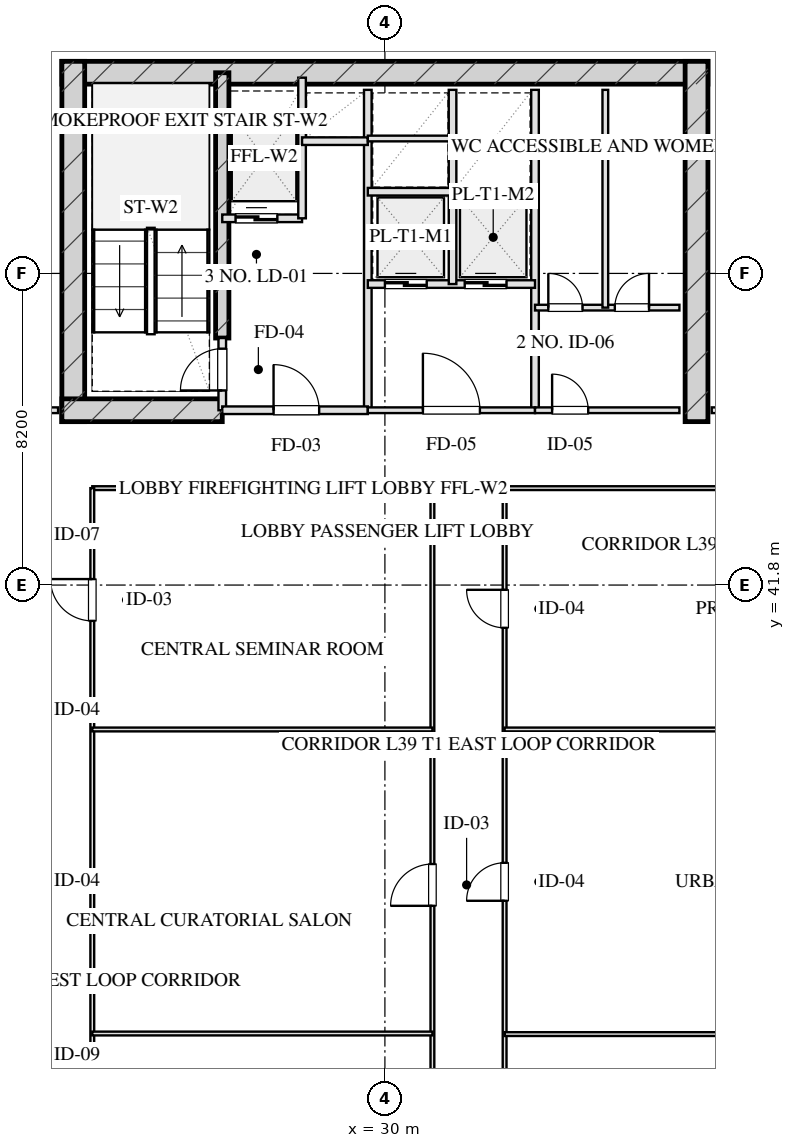
"""IFC4 building model, lengths in metres.
Left out: names, types, materials, properties, quantities, classifications, styles, units other than length and angle.
Written with IfcOpenShell. Run it as: python <this file> out.ifc"""

import sys

from ifc_helpers import new_model, si_unit, direction, frame, frame_2d, origin, place, context, subcontext, project, spatial, rectangle, extrude, element, fill, save


model = new_model("IFC4")
c1 = context("Model", 3, precision=1e-05, world=origin(), true_north=direction((0.0, 1.0)))
c2 = subcontext(c1, "Body", "Model", "MODEL_VIEW")
j1 = project(units=[si_unit("LENGTHUNIT", "METRE"), si_unit("PLANEANGLEUNIT", "RADIAN")], contexts=[c1])
p1 = place(None, origin())
s1 = spatial("IfcSite", under=j1, at=p1, CompositionType="ELEMENT")
p2 = place(p1, origin())
s2 = spatial("IfcBuilding", under=s1, at=p2, CompositionType="ELEMENT")
p3 = place(p2, frame((0.0, 0.0, 149.5)))
s3 = spatial("IfcBuildingStorey", under=s2, at=p3, CompositionType="ELEMENT", Elevation=149.5)
p4 = place(p3, frame((21.5, 55.28, 0.0), z_axis=(0.0, 0.0, 1.0), x_axis=(1.0, 0.0, 0.0)))
e1 = element("IfcWall", 1, at=p4, inside=s3, PredefinedType="SHEAR", context=c2, shape_type="SweptSolid", body=[
    extrude(rectangle(XDim=17.0, YDim=0.6, at=frame_2d((8.5, 0.0))), origin(), (0.0, 0.0, 1.0), 3.45),
])
for number, where, z_axis, x_axis in (
    (2, (21.8, 46.1, 0.0), (0.0, 0.0, 1.0), (0.0, 1.0, 0.0)),
    (3, (38.2, 46.1, 0.0), (0.0, 0.0, 1.0), (0.0, 1.0, 0.0)),
):
    element("IfcWall", number, at=place(p3, frame(where, z_axis=z_axis, x_axis=x_axis)), inside=s3, PredefinedType="SHEAR", context=c2, shape_type="SweptSolid", body=[
        extrude(rectangle(XDim=9.48, YDim=0.6, at=frame_2d((4.74, 0.0))), origin(), (0.0, 0.0, 1.0), 3.45),
    ])
p5 = place(p3, frame((25.72, 48.3, 0.0), z_axis=(0.0, 0.0, 1.0), x_axis=(0.0, 1.0, 0.0)))
e4 = element("IfcWall", 4, at=p5, inside=s3, PredefinedType="SHEAR", context=c2, shape_type="SweptSolid", body=[
    extrude(rectangle(XDim=6.98, YDim=0.35, at=frame_2d((3.49, 0.0))), origin(), (0.0, 0.0, 1.0), 3.45),
])
p6 = place(p3, frame((21.5, 46.4, 0.0), z_axis=(0.0, 0.0, 1.0), x_axis=(1.0, 0.0, 0.0)))
e5 = element("IfcWall", 5, at=p6, inside=s3, PredefinedType="SHEAR", context=c2, shape_type="SweptSolid", body=[
    extrude(rectangle(XDim=4.22, YDim=0.6, at=frame_2d((2.11, 0.0))), origin(), (0.0, 0.0, 1.0), 3.45),
])
p7 = place(p3, frame((25.72, 46.4, 0.0), z_axis=(0.0, 0.0, 1.0), x_axis=(0.0, 1.0, 0.0)))
e6 = element("IfcWall", 6, at=p7, inside=s3, PredefinedType="PARTITIONING", context=c2, shape_type="SweptSolid", body=[
    extrude(rectangle(XDim=1.9, YDim=0.2, at=frame_2d((0.95, 0.0))), origin(), (0.0, 0.0, 1.0), 3.175),
])
p8 = place(p7, frame((0.52, 0.0, 0.0)))
e7 = element("IfcOpeningElement", 7, at=p8, cuts=e6, PredefinedType="OPENING", context=c2, shape_type="SweptSolid", body=[
    extrude(rectangle(XDim=1.1, YDim=2.05, at=frame_2d((0.55, 1.025))), frame((0.0, 0.11, 0.0), z_axis=(0.0, -1.0, 0.0), x_axis=(1.0, 0.0, 0.0)), (0.0, 0.0, 1.0), 0.22),
])
p9 = place(p3, frame((29.55, 46.4, 0.0), z_axis=(0.0, 0.0, 1.0), x_axis=(0.0, 1.0, 0.0)))
e8 = element("IfcWall", 8, at=p9, inside=s3, PredefinedType="PARTITIONING", context=c2, shape_type="SweptSolid", body=[
    extrude(rectangle(XDim=8.43, YDim=0.2, at=frame_2d((4.215, 0.0))), origin(), (0.0, 0.0, 1.0), 3.175),
])
p10 = place(p3, frame((25.72, 46.4, 0.0), z_axis=(0.0, 0.0, 1.0), x_axis=(1.0, 0.0, 0.0)))
e9 = element("IfcWall", 9, at=p10, inside=s3, PredefinedType="PARTITIONING", context=c2, shape_type="SweptSolid", body=[
    extrude(rectangle(XDim=3.83, YDim=0.2, at=frame_2d((1.915, 0.0))), origin(), (0.0, 0.0, 1.0), 3.175),
])
p11 = place(p10, frame((1.35, 0.0, 0.0)))
e10 = element("IfcOpeningElement", 10, at=p11, cuts=e9, PredefinedType="OPENING", context=c2, shape_type="SweptSolid", body=[
    extrude(rectangle(XDim=1.2, YDim=2.05, at=frame_2d((0.6, 1.025))), frame((0.0, 0.11, 0.0), z_axis=(0.0, -1.0, 0.0), x_axis=(1.0, 0.0, 0.0)), (0.0, 0.0, 1.0), 0.22),
])
p12 = place(p3, frame((25.72, 51.45, 0.0), z_axis=(0.0, 0.0, 1.0), x_axis=(1.0, 0.0, 0.0)))
e11 = element("IfcWall", 11, at=p12, inside=s3, PredefinedType="PARTITIONING", context=c2, shape_type="SweptSolid", body=[
    extrude(rectangle(XDim=2.1, YDim=0.2, at=frame_2d((1.05, 0.0))), origin(), (0.0, 0.0, 1.0), 3.175),
])
p13 = place(p12, frame((0.35, 0.0, 0.0)))
e12 = element("IfcOpeningElement", 12, at=p13, cuts=e11, PredefinedType="OPENING", context=c2, shape_type="SweptSolid", body=[
    extrude(rectangle(XDim=1.1, YDim=2.05, at=frame_2d((0.55, 1.025))), frame((0.0, 0.11, 0.0), z_axis=(0.0, -1.0, 0.0), x_axis=(1.0, 0.0, 0.0)), (0.0, 0.0, 1.0), 0.22),
])
p14 = place(p3, frame((27.82, 51.45, 0.0), z_axis=(0.0, 0.0, 1.0), x_axis=(0.0, 1.0, 0.0)))
e13 = element("IfcWall", 13, at=p14, inside=s3, PredefinedType="PARTITIONING", context=c2, shape_type="SweptSolid", body=[
    extrude(rectangle(XDim=3.7, YDim=0.2, at=frame_2d((1.85, 0.0))), origin(), (0.0, 0.0, 1.0), 3.175),
])
p15 = place(p3, frame((27.82, 53.48, 0.0), z_axis=(0.0, 0.0, 1.0), x_axis=(1.0, 0.0, 0.0)))
e14 = element("IfcWall", 14, at=p15, inside=s3, PredefinedType="PARTITIONING", context=c2, shape_type="SweptSolid", body=[
    extrude(rectangle(XDim=1.73, YDim=0.2, at=frame_2d((0.865, 0.0))), origin(), (0.0, 0.0, 1.0), 3.175),
])
p16 = place(p3, frame((33.95, 46.4, 0.0), z_axis=(0.0, 0.0, 1.0), x_axis=(0.0, 1.0, 0.0)))
e15 = element("IfcWall", 15, at=p16, inside=s3, PredefinedType="PARTITIONING", context=c2, shape_type="SweptSolid", body=[
    extrude(rectangle(XDim=8.43, YDim=0.2, at=frame_2d((4.215, 0.0))), origin(), (0.0, 0.0, 1.0), 3.175),
])
p17 = place(p3, frame((29.55, 46.4, 0.0), z_axis=(0.0, 0.0, 1.0), x_axis=(1.0, 0.0, 0.0)))
e16 = element("IfcWall", 16, at=p17, inside=s3, PredefinedType="PARTITIONING", context=c2, shape_type="SweptSolid", body=[
    extrude(rectangle(XDim=4.4, YDim=0.15, at=frame_2d((2.2, 0.0))), origin(), (0.0, 0.0, 1.0), 3.175),
])
p18 = place(p17, frame((1.45, 0.0, 0.0)))
e17 = element("IfcOpeningElement", 17, at=p18, cuts=e16, PredefinedType="OPENING", context=c2, shape_type="SweptSolid", body=[
    extrude(rectangle(XDim=1.5, YDim=2.05, at=frame_2d((0.75, 1.025))), frame((0.0, 0.085, 0.0), z_axis=(0.0, -1.0, 0.0), x_axis=(1.0, 0.0, 0.0)), (0.0, 0.0, 1.0), 0.17),
])
p19 = place(p3, frame((29.55, 49.72, 0.0), z_axis=(0.0, 0.0, 1.0), x_axis=(1.0, 0.0, 0.0)))
e18 = element("IfcWall", 18, at=p19, inside=s3, PredefinedType="PARTITIONING", context=c2, shape_type="SweptSolid", body=[
    extrude(rectangle(XDim=4.4, YDim=0.2, at=frame_2d((2.2, 0.0))), origin(), (0.0, 0.0, 1.0), 3.175),
])
p20 = place(p19, frame((0.45, 0.0, 0.0)))
e19 = element("IfcOpeningElement", 19, at=p20, cuts=e18, PredefinedType="OPENING", context=c2, shape_type="SweptSolid", body=[
    extrude(rectangle(XDim=1.1, YDim=2.05, at=frame_2d((0.55, 1.025))), frame((0.0, 0.11, 0.0), z_axis=(0.0, -1.0, 0.0), x_axis=(1.0, 0.0, 0.0)), (0.0, 0.0, 1.0), 0.22),
])
p21 = place(p19, frame((2.55, 0.0, 0.0)))
e20 = element("IfcOpeningElement", 20, at=p21, cuts=e18, PredefinedType="OPENING", context=c2, shape_type="SweptSolid", body=[
    extrude(rectangle(XDim=1.1, YDim=2.05, at=frame_2d((0.55, 1.025))), frame((0.0, 0.11, 0.0), z_axis=(0.0, -1.0, 0.0), x_axis=(1.0, 0.0, 0.0)), (0.0, 0.0, 1.0), 0.22),
])
p22 = place(p3, frame((31.78, 49.72, 0.0), z_axis=(0.0, 0.0, 1.0), x_axis=(0.0, 1.0, 0.0)))
e21 = element("IfcWall", 21, at=p22, inside=s3, PredefinedType="PARTITIONING", context=c2, shape_type="SweptSolid", body=[
    extrude(rectangle(XDim=5.11, YDim=0.2, at=frame_2d((2.555, 0.0))), origin(), (0.0, 0.0, 1.0), 3.175),
])
p23 = place(p3, frame((29.55, 52.15, 0.0), z_axis=(0.0, 0.0, 1.0), x_axis=(1.0, 0.0, 0.0)))
e22 = element("IfcWall", 22, at=p23, inside=s3, PredefinedType="PARTITIONING", context=c2, shape_type="SweptSolid", body=[
    extrude(rectangle(XDim=4.4, YDim=0.2, at=frame_2d((2.2, 0.0))), origin(), (0.0, 0.0, 1.0), 3.175),
])
p24 = place(p3, frame((29.55, 53.55, 0.0), z_axis=(0.0, 0.0, 1.0), x_axis=(1.0, 0.0, 0.0)))
e23 = element("IfcWall", 23, at=p24, inside=s3, PredefinedType="PARTITIONING", context=c2, shape_type="SweptSolid", body=[
    extrude(rectangle(XDim=2.23, YDim=0.15, at=frame_2d((1.115, 0.0))), origin(), (0.0, 0.0, 1.0), 3.175),
])
p25 = place(p3, frame((33.95, 46.4, 0.0), z_axis=(0.0, 0.0, 1.0), x_axis=(1.0, 0.0, 0.0)))
e24 = element("IfcWall", 24, at=p25, inside=s3, PredefinedType="PARTITIONING", context=c2, shape_type="SweptSolid", body=[
    extrude(rectangle(XDim=3.8, YDim=0.15, at=frame_2d((1.9, 0.0))), origin(), (0.0, 0.0, 1.0), 3.175),
])
p26 = place(p25, frame((0.45, 0.0, 0.0)))
e25 = element("IfcOpeningElement", 25, at=p26, cuts=e24, PredefinedType="OPENING", context=c2, shape_type="SweptSolid", body=[
    extrude(rectangle(XDim=0.95, YDim=2.05, at=frame_2d((0.475, 1.025))), frame((0.0, 0.085, 0.0), z_axis=(0.0, -1.0, 0.0), x_axis=(1.0, 0.0, 0.0)), (0.0, 0.0, 1.0), 0.17),
])
p27 = place(p3, frame((33.95, 49.1, 0.0), z_axis=(0.0, 0.0, 1.0), x_axis=(1.0, 0.0, 0.0)))
e26 = element("IfcWall", 26, at=p27, inside=s3, PredefinedType="PARTITIONING", context=c2, shape_type="SweptSolid", body=[
    extrude(rectangle(XDim=3.8, YDim=0.15, at=frame_2d((1.9, 0.0))), origin(), (0.0, 0.0, 1.0), 3.175),
])
p28 = place(p27, frame((0.35, 0.0, 0.0)))
e27 = element("IfcOpeningElement", 27, at=p28, cuts=e26, PredefinedType="OPENING", context=c2, shape_type="SweptSolid", body=[
    extrude(rectangle(XDim=0.9, YDim=2.05, at=frame_2d((0.45, 1.025))), frame((0.0, 0.085, 0.0), z_axis=(0.0, -1.0, 0.0), x_axis=(1.0, 0.0, 0.0)), (0.0, 0.0, 1.0), 0.17),
])
p29 = place(p27, frame((2.1, 0.0, 0.0)))
e28 = element("IfcOpeningElement", 28, at=p29, cuts=e26, PredefinedType="OPENING", context=c2, shape_type="SweptSolid", body=[
    extrude(rectangle(XDim=0.9, YDim=2.05, at=frame_2d((0.45, 1.025))), frame((0.0, 0.085, 0.0), z_axis=(0.0, -1.0, 0.0), x_axis=(1.0, 0.0, 0.0)), (0.0, 0.0, 1.0), 0.17),
])
p30 = place(p3, frame((35.8, 49.1, 0.0), z_axis=(0.0, 0.0, 1.0), x_axis=(0.0, 1.0, 0.0)))
e29 = element("IfcWall", 29, at=p30, inside=s3, PredefinedType="PARTITIONING", context=c2, shape_type="SweptSolid", body=[
    extrude(rectangle(XDim=5.73, YDim=0.15, at=frame_2d((2.865, 0.0))), origin(), (0.0, 0.0, 1.0), 3.175),
])
p31 = place(p3, frame((11.4, 46.4, 0.0), z_axis=(0.0, 0.0, 1.0), x_axis=(1.0, 0.0, 0.0)))
e30 = element("IfcWall", 30, at=p31, inside=s3, PredefinedType="PARTITIONING", context=c2, shape_type="SweptSolid", body=[
    extrude(rectangle(XDim=10.0, YDim=0.15, at=frame_2d((5.0, 0.0))), origin(), (0.0, 0.0, 1.0), 3.175),
])
p32 = place(p31, frame((4.2, 0.0, 0.0)))
e31 = element("IfcOpeningElement", 31, at=p32, cuts=e30, PredefinedType="OPENING", context=c2, shape_type="SweptSolid", body=[
    extrude(rectangle(XDim=1.0, YDim=2.05, at=frame_2d((0.5, 1.025))), frame((0.0, 0.085, 0.0), z_axis=(0.0, -1.0, 0.0), x_axis=(1.0, 0.0, 0.0)), (0.0, 0.0, 1.0), 0.17),
])
p33 = place(p3, frame((38.6, 46.4, 0.0), z_axis=(0.0, 0.0, 1.0), x_axis=(1.0, 0.0, 0.0)))
e32 = element("IfcWall", 32, at=p33, inside=s3, PredefinedType="PARTITIONING", context=c2, shape_type="SweptSolid", body=[
    extrude(rectangle(XDim=10.0, YDim=0.15, at=frame_2d((5.0, 0.0))), origin(), (0.0, 0.0, 1.0), 3.175),
])
p34 = place(p33, frame((4.2, 0.0, 0.0)))
e33 = element("IfcOpeningElement", 33, at=p34, cuts=e32, PredefinedType="OPENING", context=c2, shape_type="SweptSolid", body=[
    extrude(rectangle(XDim=1.0, YDim=2.05, at=frame_2d((0.5, 1.025))), frame((0.0, 0.085, 0.0), z_axis=(0.0, -1.0, 0.0), x_axis=(1.0, 0.0, 0.0)), (0.0, 0.0, 1.0), 0.17),
])
p35 = place(p3, frame((22.3, 44.35, 0.0), z_axis=(0.0, 0.0, 1.0), x_axis=(1.0, 0.0, 0.0)))
e34 = element("IfcWall", 34, at=p35, inside=s3, PredefinedType="MOVABLE", context=c2, shape_type="SweptSolid", body=[
    extrude(rectangle(XDim=8.95, YDim=0.1, at=frame_2d((4.475, 0.0))), origin(), (0.0, 0.0, 1.0), 3.175),
])
p36 = place(p3, frame((33.15, 44.35, 0.0), z_axis=(0.0, 0.0, 1.0), x_axis=(1.0, 0.0, 0.0)))
e35 = element("IfcWall", 35, at=p36, inside=s3, PredefinedType="MOVABLE", context=c2, shape_type="SweptSolid", body=[
    extrude(rectangle(XDim=15.45, YDim=0.1, at=frame_2d((7.725, 0.0))), origin(), (0.0, 0.0, 1.0), 3.175),
])
p37 = place(p3, frame((22.3, 23.65, 0.0), z_axis=(0.0, 0.0, 1.0), x_axis=(0.0, 1.0, 0.0)))
e36 = element("IfcWall", 36, at=p37, inside=s3, PredefinedType="MOVABLE", context=c2, shape_type="SweptSolid", body=[
    extrude(rectangle(XDim=20.7, YDim=0.1, at=frame_2d((10.35, 0.0))), origin(), (0.0, 0.0, 1.0), 3.175),
])
p38 = place(p37, frame((2.857, 0.0, 0.0)))
e37 = element("IfcOpeningElement", 37, at=p38, cuts=e36, PredefinedType="OPENING", context=c2, shape_type="SweptSolid", body=[
    extrude(rectangle(XDim=1.1, YDim=2.05, at=frame_2d((0.55, 1.025))), frame((0.0, 0.06, 0.0), z_axis=(0.0, -1.0, 0.0), x_axis=(1.0, 0.0, 0.0)), (0.0, 0.0, 1.0), 0.12),
])
p39 = place(p37, frame((17.208, 0.0, 0.0)))
e38 = element("IfcOpeningElement", 38, at=p39, cuts=e36, PredefinedType="OPENING", context=c2, shape_type="SweptSolid", body=[
    extrude(rectangle(XDim=1.1, YDim=2.05, at=frame_2d((0.55, 1.025))), frame((0.0, 0.06, 0.0), z_axis=(0.0, -1.0, 0.0), x_axis=(1.0, 0.0, 0.0)), (0.0, 0.0, 1.0), 0.12),
])
p40 = place(p3, frame((31.25, 23.65, 0.0), z_axis=(0.0, 0.0, 1.0), x_axis=(0.0, 1.0, 0.0)))
e39 = element("IfcWall", 39, at=p40, inside=s3, PredefinedType="MOVABLE", context=c2, shape_type="SweptSolid", body=[
    extrude(rectangle(XDim=20.7, YDim=0.1, at=frame_2d((10.35, 0.0))), origin(), (0.0, 0.0, 1.0), 3.175),
])
p41 = place(p40, frame((9.71, 0.0, 0.0)))
e40 = element("IfcOpeningElement", 40, at=p41, cuts=e39, PredefinedType="OPENING", context=c2, shape_type="SweptSolid", body=[
    extrude(rectangle(XDim=1.1, YDim=2.05, at=frame_2d((0.55, 1.025))), frame((0.0, 0.06, 0.0), z_axis=(0.0, -1.0, 0.0), x_axis=(1.0, 0.0, 0.0)), (0.0, 0.0, 1.0), 0.12),
])
p42 = place(p3, frame((33.15, 23.65, 0.0), z_axis=(0.0, 0.0, 1.0), x_axis=(0.0, 1.0, 0.0)))
e41 = element("IfcWall", 41, at=p42, inside=s3, PredefinedType="MOVABLE", context=c2, shape_type="SweptSolid", body=[
    extrude(rectangle(XDim=20.7, YDim=0.1, at=frame_2d((10.35, 0.0))), origin(), (0.0, 0.0, 1.0), 3.175),
])
p43 = place(p42, frame((2.667, 0.0, 0.0)))
e42 = element("IfcOpeningElement", 42, at=p43, cuts=e41, PredefinedType="OPENING", context=c2, shape_type="SweptSolid", body=[
    extrude(rectangle(XDim=1.0, YDim=2.05, at=frame_2d((0.5, 1.025))), frame((0.0, 0.06, 0.0), z_axis=(0.0, -1.0, 0.0), x_axis=(1.0, 0.0, 0.0)), (0.0, 0.0, 1.0), 0.12),
])
p44 = place(p42, frame((9.843, 0.0, 0.0)))
e43 = element("IfcOpeningElement", 43, at=p44, cuts=e41, PredefinedType="OPENING", context=c2, shape_type="SweptSolid", body=[
    extrude(rectangle(XDim=1.0, YDim=2.05, at=frame_2d((0.5, 1.025))), frame((0.0, 0.06, 0.0), z_axis=(0.0, -1.0, 0.0), x_axis=(1.0, 0.0, 0.0)), (0.0, 0.0, 1.0), 0.12),
])
p45 = place(p42, frame((17.025, 0.0, 0.0)))
e44 = element("IfcOpeningElement", 44, at=p45, cuts=e41, PredefinedType="OPENING", context=c2, shape_type="SweptSolid", body=[
    extrude(rectangle(XDim=1.0, YDim=2.05, at=frame_2d((0.5, 1.025))), frame((0.0, 0.06, 0.0), z_axis=(0.0, -1.0, 0.0), x_axis=(1.0, 0.0, 0.0)), (0.0, 0.0, 1.0), 0.12),
])
for number, where, z_axis, x_axis in (
    (45, (22.3, 30.0, 0.0), (0.0, 0.0, 1.0), (1.0, 0.0, 0.0)),
    (46, (22.3, 38.0, 0.0), (0.0, 0.0, 1.0), (1.0, 0.0, 0.0)),
):
    element("IfcWall", number, at=place(p3, frame(where, z_axis=z_axis, x_axis=x_axis)), inside=s3, PredefinedType="MOVABLE", context=c2, shape_type="SweptSolid", body=[
        extrude(rectangle(XDim=8.95, YDim=0.1, at=frame_2d((4.475, 0.0))), origin(), (0.0, 0.0, 1.0), 3.175),
    ])
for number, where, z_axis, x_axis in (
    (47, (33.15, 29.985, 0.0), (0.0, 0.0, 1.0), (1.0, 0.0, 0.0)),
    (48, (33.15, 38.0, 0.0), (0.0, 0.0, 1.0), (1.0, 0.0, 0.0)),
):
    element("IfcWall", number, at=place(p3, frame(where, z_axis=z_axis, x_axis=x_axis)), inside=s3, PredefinedType="MOVABLE", context=c2, shape_type="SweptSolid", body=[
        extrude(rectangle(XDim=15.45, YDim=0.1, at=frame_2d((7.725, 0.0))), origin(), (0.0, 0.0, 1.0), 3.175),
    ])
p46 = place(p8, origin())
e49 = element("IfcDoor", 49, at=p46, inside=s3, OperationType="SINGLE_SWING_LEFT", PredefinedType="DOOR", context=c2, shape_type="SweptSolid", body=[
    extrude(rectangle(XDim=1.1, YDim=2.05, at=frame_2d((0.55, 1.025))), frame((0.0, 0.025, 0.0), z_axis=(0.0, -1.0, 0.0), x_axis=(1.0, 0.0, 0.0)), (0.0, 0.0, 1.0), 0.05),
])
fill(e7, e49)
p47 = place(p11, origin())
e50 = element("IfcDoor", 50, at=p47, inside=s3, OperationType="SINGLE_SWING_LEFT", PredefinedType="DOOR", context=c2, shape_type="SweptSolid", body=[
    extrude(rectangle(XDim=1.2, YDim=2.05, at=frame_2d((0.6, 1.025))), frame((0.0, 0.025, 0.0), z_axis=(0.0, -1.0, 0.0), x_axis=(1.0, 0.0, 0.0)), (0.0, 0.0, 1.0), 0.05),
])
fill(e10, e50)
p48 = place(p13, origin())
e51 = element("IfcDoor", 51, at=p48, inside=s3, OperationType="DOUBLE_DOOR_SLIDING", PredefinedType="DOOR", context=c2, shape_type="SweptSolid", body=[
    extrude(rectangle(XDim=1.1, YDim=2.05, at=frame_2d((0.55, 1.025))), frame((0.0, 0.025, 0.0), z_axis=(0.0, -1.0, 0.0), x_axis=(1.0, 0.0, 0.0)), (0.0, 0.0, 1.0), 0.05),
])
fill(e12, e51)
p49 = place(p18, origin())
e52 = element("IfcDoor", 52, at=p49, inside=s3, OperationType="SINGLE_SWING_LEFT", PredefinedType="DOOR", context=c2, shape_type="SweptSolid", body=[
    extrude(rectangle(XDim=1.5, YDim=2.05, at=frame_2d((0.75, 1.025))), frame((0.0, 0.025, 0.0), z_axis=(0.0, -1.0, 0.0), x_axis=(1.0, 0.0, 0.0)), (0.0, 0.0, 1.0), 0.05),
])
fill(e17, e52)
p50 = place(p20, origin())
e53 = element("IfcDoor", 53, at=p50, inside=s3, OperationType="DOUBLE_DOOR_SLIDING", PredefinedType="DOOR", context=c2, shape_type="SweptSolid", body=[
    extrude(rectangle(XDim=1.1, YDim=2.05, at=frame_2d((0.55, 1.025))), frame((0.0, 0.025, 0.0), z_axis=(0.0, -1.0, 0.0), x_axis=(1.0, 0.0, 0.0)), (0.0, 0.0, 1.0), 0.05),
])
fill(e19, e53)
p51 = place(p21, origin())
e54 = element("IfcDoor", 54, at=p51, inside=s3, OperationType="DOUBLE_DOOR_SLIDING", PredefinedType="DOOR", context=c2, shape_type="SweptSolid", body=[
    extrude(rectangle(XDim=1.1, YDim=2.05, at=frame_2d((0.55, 1.025))), frame((0.0, 0.025, 0.0), z_axis=(0.0, -1.0, 0.0), x_axis=(1.0, 0.0, 0.0)), (0.0, 0.0, 1.0), 0.05),
])
fill(e20, e54)
p52 = place(p26, origin())
e55 = element("IfcDoor", 55, at=p52, inside=s3, OperationType="SINGLE_SWING_LEFT", PredefinedType="DOOR", context=c2, shape_type="SweptSolid", body=[
    extrude(rectangle(XDim=0.95, YDim=2.05, at=frame_2d((0.475, 1.025))), frame((0.0, 0.025, 0.0), z_axis=(0.0, -1.0, 0.0), x_axis=(1.0, 0.0, 0.0)), (0.0, 0.0, 1.0), 0.05),
])
fill(e25, e55)
p53 = place(p28, origin())
e56 = element("IfcDoor", 56, at=p53, inside=s3, OperationType="SINGLE_SWING_LEFT", PredefinedType="DOOR", context=c2, shape_type="SweptSolid", body=[
    extrude(rectangle(XDim=0.9, YDim=2.05, at=frame_2d((0.45, 1.025))), frame((0.0, 0.025, 0.0), z_axis=(0.0, -1.0, 0.0), x_axis=(1.0, 0.0, 0.0)), (0.0, 0.0, 1.0), 0.05),
])
fill(e27, e56)
p54 = place(p29, origin())
e57 = element("IfcDoor", 57, at=p54, inside=s3, OperationType="SINGLE_SWING_RIGHT", PredefinedType="DOOR", context=c2, shape_type="SweptSolid", body=[
    extrude(rectangle(XDim=0.9, YDim=2.05, at=frame_2d((0.45, 1.025))), frame((0.0, 0.025, 0.0), z_axis=(0.0, -1.0, 0.0), x_axis=(1.0, 0.0, 0.0)), (0.0, 0.0, 1.0), 0.05),
])
fill(e28, e57)
p55 = place(p39, origin())
e58 = element("IfcDoor", 58, at=p55, inside=s3, OperationType="SINGLE_SWING_RIGHT", PredefinedType="DOOR", context=c2, shape_type="SweptSolid", body=[
    extrude(rectangle(XDim=1.1, YDim=2.05, at=frame_2d((0.55, 1.025))), frame((0.0, 0.025, 0.0), z_axis=(0.0, -1.0, 0.0), x_axis=(1.0, 0.0, 0.0)), (0.0, 0.0, 1.0), 0.05),
])
fill(e38, e58)
p56 = place(p41, origin())
e59 = element("IfcDoor", 59, at=p56, inside=s3, OperationType="SINGLE_SWING_LEFT", PredefinedType="DOOR", context=c2, shape_type="SweptSolid", body=[
    extrude(rectangle(XDim=1.1, YDim=2.05, at=frame_2d((0.55, 1.025))), frame((0.0, 0.025, 0.0), z_axis=(0.0, -1.0, 0.0), x_axis=(1.0, 0.0, 0.0)), (0.0, 0.0, 1.0), 0.05),
])
fill(e40, e59)
p57 = place(p44, origin())
e60 = element("IfcDoor", 60, at=p57, inside=s3, OperationType="SINGLE_SWING_LEFT", PredefinedType="DOOR", context=c2, shape_type="SweptSolid", body=[
    extrude(rectangle(XDim=1.0, YDim=2.05, at=frame_2d((0.5, 1.025))), frame((0.0, 0.025, 0.0), z_axis=(0.0, -1.0, 0.0), x_axis=(1.0, 0.0, 0.0)), (0.0, 0.0, 1.0), 0.05),
])
fill(e43, e60)
p58 = place(p45, origin())
e61 = element("IfcDoor", 61, at=p58, inside=s3, OperationType="SINGLE_SWING_RIGHT", PredefinedType="DOOR", context=c2, shape_type="SweptSolid", body=[
    extrude(rectangle(XDim=1.0, YDim=2.05, at=frame_2d((0.5, 1.025))), frame((0.0, 0.025, 0.0), z_axis=(0.0, -1.0, 0.0), x_axis=(1.0, 0.0, 0.0)), (0.0, 0.0, 1.0), 0.05),
])
fill(e44, e61)
save(model, sys.argv[1])
